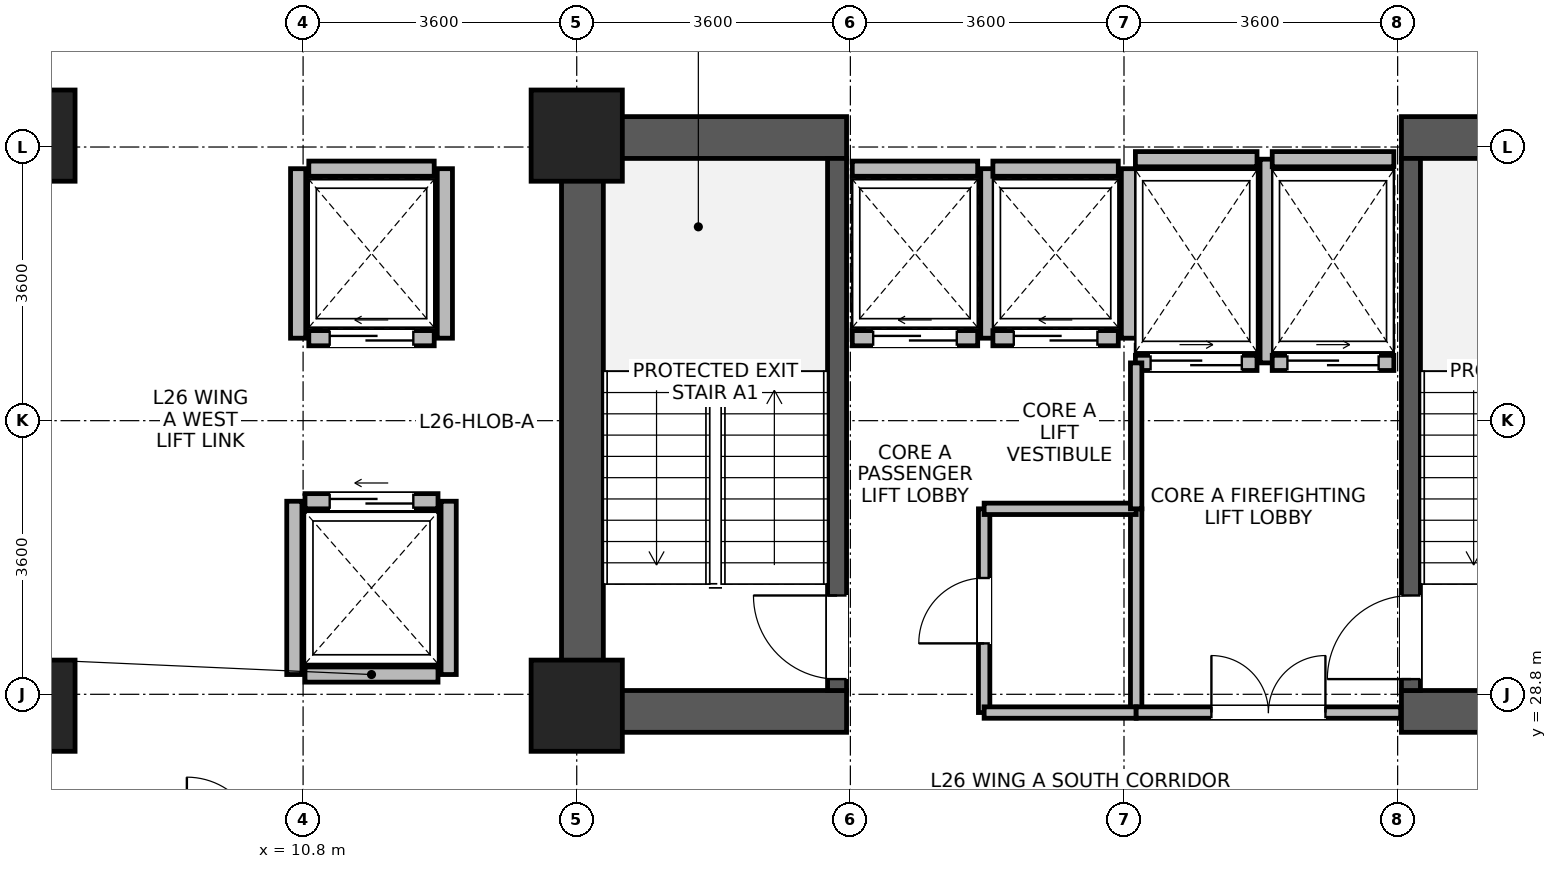
"""IFC4 building model, lengths in metres.
Left out: names, types, materials, properties, quantities, classifications, styles, units other than length and angle.
Written with IfcOpenShell. Run it as: python <this file> out.ifc"""

import sys

from ifc_helpers import new_model, si_unit, direction, frame, frame_2d, origin, origin_2d, place, context, subcontext, project, spatial, rectangle, extrude, source, transform, mapped, element, fill, save


model = new_model("IFC4")
c1 = context("Model", 3, precision=1e-05, world=origin(), true_north=direction((0.0, 1.0)))
c2 = subcontext(c1, "Body", "Model", "MODEL_VIEW")
j1 = project(units=[si_unit("LENGTHUNIT", "METRE"), si_unit("PLANEANGLEUNIT", "RADIAN")], contexts=[c1])
p1 = place(None, origin())
s1 = spatial("IfcSite", under=j1, at=p1, CompositionType="ELEMENT")
p2 = place(p1, origin())
s2 = spatial("IfcBuilding", under=s1, at=p2, CompositionType="ELEMENT")
p3 = place(p2, frame((0.0, 0.0, 104.5)))
s3 = spatial("IfcBuildingStorey", under=s2, at=p3, CompositionType="ELEMENT", Elevation=104.5)
p4 = place(p3, frame((14.475, 28.3, 0.0), z_axis=(0.0, 0.0, 1.0), x_axis=(0.0, 1.0, 0.0)))
e1 = element("IfcWall", 1, at=p4, inside=s3, PredefinedType="SHEAR", context=c2, shape_type="SweptSolid", body=[
    extrude(rectangle(XDim=8.1, YDim=0.55, at=frame_2d((4.05, 0.0))), origin(), (0.0, 0.0, 1.0), 3.45),
])
for number, where, z_axis, x_axis in (
    (2, (14.75, 28.575, 0.0), (0.0, 0.0, 1.0), (1.0, 0.0, 0.0)),
    (3, (25.25, 28.575, 0.0), (0.0, 0.0, 1.0), (1.0, 0.0, 0.0)),
    (4, (14.75, 36.125, 0.0), (0.0, 0.0, 1.0), (1.0, 0.0, 0.0)),
    (5, (25.25, 36.125, 0.0), (0.0, 0.0, 1.0), (1.0, 0.0, 0.0)),
):
    element("IfcWall", number, at=place(p3, frame(where, z_axis=z_axis, x_axis=x_axis)), inside=s3, PredefinedType="SHEAR", context=c2, shape_type="SweptSolid", body=[
        extrude(rectangle(XDim=3.2, YDim=0.55, at=frame_2d((1.6, 0.0))), origin(), (0.0, 0.0, 1.0), 3.45),
    ])
p5 = place(p3, frame((17.825, 28.85, 0.0), z_axis=(0.0, 0.0, 1.0), x_axis=(0.0, 1.0, 0.0)))
e6 = element("IfcWall", 6, at=p5, inside=s3, PredefinedType="SHEAR", context=c2, shape_type="SweptSolid", body=[
    extrude(rectangle(XDim=7.0, YDim=0.25, at=frame_2d((3.5, 0.0))), origin(), (0.0, 0.0, 1.0), 3.45),
])
p6 = place(p5, frame((0.15, 0.0, 0.0)))
e7 = element("IfcOpeningElement", 7, at=p6, cuts=e6, PredefinedType="OPENING", context=c2, shape_type="SweptSolid", body=[
    extrude(rectangle(XDim=1.1, YDim=2.08, at=frame_2d((0.55, 1.04))), frame((0.0, 0.135, 0.0), z_axis=(0.0, -1.0, 0.0), x_axis=(1.0, 0.0, 0.0)), (0.0, 0.0, 1.0), 0.27),
])
p7 = place(p3, frame((25.375, 28.85, 0.0), z_axis=(0.0, 0.0, 1.0), x_axis=(0.0, 1.0, 0.0)))
e8 = element("IfcWall", 8, at=p7, inside=s3, PredefinedType="SHEAR", context=c2, shape_type="SweptSolid", body=[
    extrude(rectangle(XDim=7.0, YDim=0.25, at=frame_2d((3.5, 0.0))), origin(), (0.0, 0.0, 1.0), 3.45),
])
p8 = place(p7, frame((0.15, 0.0, 0.0)))
e9 = element("IfcOpeningElement", 9, at=p8, cuts=e8, PredefinedType="OPENING", context=c2, shape_type="SweptSolid", body=[
    extrude(rectangle(XDim=1.1, YDim=2.08, at=frame_2d((0.55, 1.04))), frame((0.0, 0.135, 0.0), z_axis=(0.0, -1.0, 0.0), x_axis=(1.0, 0.0, 0.0)), (0.0, 0.0, 1.0), 0.27),
])
m1 = source(origin(), c2, "Body", "SweptSolid", [
    extrude(rectangle(XDim=1.2, YDim=1.2, at=origin_2d()), origin(), (0.0, 0.0, 1.0), 3.7),
])
for number, where, z_axis, x_axis in (
    (10, (7.2, 28.65, 0.0), (0.0, 0.0, 1.0), (1.0, 0.0, 0.0)),
    (11, (7.2, 36.15, 0.0), (0.0, 0.0, 1.0), (1.0, 0.0, 0.0)),
    (12, (14.4, 28.65, 0.0), (0.0, 0.0, 1.0), (1.0, 0.0, 0.0)),
    (13, (14.4, 36.15, 0.0), (0.0, 0.0, 1.0), (1.0, 0.0, 0.0)),
):
    element("IfcColumn", number, at=place(p3, frame(where, z_axis=z_axis, x_axis=x_axis)), inside=s3, PredefinedType="COLUMN", context=c2, shape_type="MappedRepresentation", body=[
        mapped(m1, transform((0.0, 0.0, 0.0), x_axis=(1.0, 0.0, 0.0), y_axis=(0.0, 1.0, 0.0), z_axis=(0.0, 0.0, 1.0), scale=1.0)),
    ])
p9 = place(p3, frame((18.025, 33.485, 0.0), z_axis=(0.0, 0.0, 1.0), x_axis=(1.0, 0.0, 0.0)))
e14 = element("IfcWall", 14, at=p9, inside=s3, PredefinedType="PARTITIONING", context=c2, shape_type="SweptSolid", body=[
    extrude(rectangle(XDim=1.65, YDim=0.2, at=frame_2d((0.825, 0.0))), origin(), (0.0, 0.0, 1.0), 3.43),
])
p10 = place(p9, frame((0.275, 0.0, 0.0)))
e15 = element("IfcOpeningElement", 15, at=p10, cuts=e14, PredefinedType="OPENING", context=c2, shape_type="SweptSolid", body=[
    extrude(rectangle(XDim=1.1, YDim=2.12, at=frame_2d((0.55, 1.06))), frame((0.0, 0.11, 0.0), z_axis=(0.0, -1.0, 0.0), x_axis=(1.0, 0.0, 0.0)), (0.0, 0.0, 1.0), 0.22),
])
p11 = place(p3, frame((18.025, 35.715, 0.0), z_axis=(0.0, 0.0, 1.0), x_axis=(1.0, 0.0, 0.0)))
e16 = element("IfcWall", 16, at=p11, inside=s3, PredefinedType="PARTITIONING", context=c2, shape_type="SweptSolid", body=[
    extrude(rectangle(XDim=1.65, YDim=0.2, at=frame_2d((0.825, 0.0))), origin(), (0.0, 0.0, 1.0), 3.43),
])
p12 = place(p3, frame((19.815, 33.485, 0.0), z_axis=(0.0, 0.0, 1.0), x_axis=(0.0, 1.0, 0.0)))
e17 = element("IfcWall", 17, at=p12, inside=s3, PredefinedType="PARTITIONING", context=c2, shape_type="SweptSolid", body=[
    extrude(rectangle(XDim=2.23, YDim=0.2, at=frame_2d((1.115, 0.0))), origin(), (0.0, 0.0, 1.0), 3.43),
])
p13 = place(p3, frame((19.875, 33.485, 0.0), z_axis=(0.0, 0.0, 1.0), x_axis=(1.0, 0.0, 0.0)))
e18 = element("IfcWall", 18, at=p13, inside=s3, PredefinedType="PARTITIONING", context=c2, shape_type="SweptSolid", body=[
    extrude(rectangle(XDim=1.65, YDim=0.2, at=frame_2d((0.825, 0.0))), origin(), (0.0, 0.0, 1.0), 3.43),
])
p14 = place(p13, frame((0.275, 0.0, 0.0)))
e19 = element("IfcOpeningElement", 19, at=p14, cuts=e18, PredefinedType="OPENING", context=c2, shape_type="SweptSolid", body=[
    extrude(rectangle(XDim=1.1, YDim=2.12, at=frame_2d((0.55, 1.06))), frame((0.0, 0.11, 0.0), z_axis=(0.0, -1.0, 0.0), x_axis=(1.0, 0.0, 0.0)), (0.0, 0.0, 1.0), 0.22),
])
p15 = place(p3, frame((19.875, 35.715, 0.0), z_axis=(0.0, 0.0, 1.0), x_axis=(1.0, 0.0, 0.0)))
e20 = element("IfcWall", 20, at=p15, inside=s3, PredefinedType="PARTITIONING", context=c2, shape_type="SweptSolid", body=[
    extrude(rectangle(XDim=1.65, YDim=0.2, at=frame_2d((0.825, 0.0))), origin(), (0.0, 0.0, 1.0), 3.43),
])
p16 = place(p3, frame((21.665, 33.485, 0.0), z_axis=(0.0, 0.0, 1.0), x_axis=(0.0, 1.0, 0.0)))
e21 = element("IfcWall", 21, at=p16, inside=s3, PredefinedType="PARTITIONING", context=c2, shape_type="SweptSolid", body=[
    extrude(rectangle(XDim=2.23, YDim=0.2, at=frame_2d((1.115, 0.0))), origin(), (0.0, 0.0, 1.0), 3.43),
])
p17 = place(p3, frame((10.825, 29.06, 0.0), z_axis=(0.0, 0.0, 1.0), x_axis=(1.0, 0.0, 0.0)))
e22 = element("IfcWall", 22, at=p17, inside=s3, PredefinedType="PARTITIONING", context=c2, shape_type="SweptSolid", body=[
    extrude(rectangle(XDim=1.75, YDim=0.2, at=frame_2d((0.875, 0.0))), origin(), (0.0, 0.0, 1.0), 3.43),
])
p18 = place(p3, frame((10.825, 31.34, 0.0), z_axis=(0.0, 0.0, 1.0), x_axis=(1.0, 0.0, 0.0)))
e23 = element("IfcWall", 23, at=p18, inside=s3, PredefinedType="PARTITIONING", context=c2, shape_type="SweptSolid", body=[
    extrude(rectangle(XDim=1.75, YDim=0.2, at=frame_2d((0.875, 0.0))), origin(), (0.0, 0.0, 1.0), 3.43),
])
p19 = place(p18, frame((0.325, 0.0, 0.0)))
e24 = element("IfcOpeningElement", 24, at=p19, cuts=e23, PredefinedType="OPENING", context=c2, shape_type="SweptSolid", body=[
    extrude(rectangle(XDim=1.1, YDim=2.12, at=frame_2d((0.55, 1.06))), frame((0.0, 0.11, 0.0), z_axis=(0.0, -1.0, 0.0), x_axis=(1.0, 0.0, 0.0)), (0.0, 0.0, 1.0), 0.22),
])
for number, where, z_axis, x_axis in (
    (25, (10.685, 29.06, 0.0), (0.0, 0.0, 1.0), (0.0, 1.0, 0.0)),
    (26, (12.715, 29.06, 0.0), (0.0, 0.0, 1.0), (0.0, 1.0, 0.0)),
):
    element("IfcWall", number, at=place(p3, frame(where, z_axis=z_axis, x_axis=x_axis)), inside=s3, PredefinedType="PARTITIONING", context=c2, shape_type="SweptSolid", body=[
        extrude(rectangle(XDim=2.28, YDim=0.2, at=frame_2d((1.14, 0.0))), origin(), (0.0, 0.0, 1.0), 3.43),
    ])
p20 = place(p3, frame((10.875, 33.485, 0.0), z_axis=(0.0, 0.0, 1.0), x_axis=(1.0, 0.0, 0.0)))
e27 = element("IfcWall", 27, at=p20, inside=s3, PredefinedType="PARTITIONING", context=c2, shape_type="SweptSolid", body=[
    extrude(rectangle(XDim=1.65, YDim=0.2, at=frame_2d((0.825, 0.0))), origin(), (0.0, 0.0, 1.0), 3.43),
])
p21 = place(p20, frame((0.275, 0.0, 0.0)))
e28 = element("IfcOpeningElement", 28, at=p21, cuts=e27, PredefinedType="OPENING", context=c2, shape_type="SweptSolid", body=[
    extrude(rectangle(XDim=1.1, YDim=2.12, at=frame_2d((0.55, 1.06))), frame((0.0, 0.11, 0.0), z_axis=(0.0, -1.0, 0.0), x_axis=(1.0, 0.0, 0.0)), (0.0, 0.0, 1.0), 0.22),
])
p22 = place(p3, frame((10.875, 35.715, 0.0), z_axis=(0.0, 0.0, 1.0), x_axis=(1.0, 0.0, 0.0)))
e29 = element("IfcWall", 29, at=p22, inside=s3, PredefinedType="PARTITIONING", context=c2, shape_type="SweptSolid", body=[
    extrude(rectangle(XDim=1.65, YDim=0.2, at=frame_2d((0.825, 0.0))), origin(), (0.0, 0.0, 1.0), 3.43),
])
for number, where, z_axis, x_axis in (
    (30, (10.735, 33.485, 0.0), (0.0, 0.0, 1.0), (0.0, 1.0, 0.0)),
    (31, (12.665, 33.485, 0.0), (0.0, 0.0, 1.0), (0.0, 1.0, 0.0)),
):
    element("IfcWall", number, at=place(p3, frame(where, z_axis=z_axis, x_axis=x_axis)), inside=s3, PredefinedType="PARTITIONING", context=c2, shape_type="SweptSolid", body=[
        extrude(rectangle(XDim=2.23, YDim=0.2, at=frame_2d((1.115, 0.0))), origin(), (0.0, 0.0, 1.0), 3.43),
    ])
p23 = place(p3, frame((21.75, 33.16, 0.0), z_axis=(0.0, 0.0, 1.0), x_axis=(1.0, 0.0, 0.0)))
e32 = element("IfcWall", 32, at=p23, inside=s3, PredefinedType="PARTITIONING", context=c2, shape_type="SweptSolid", body=[
    extrude(rectangle(XDim=1.6, YDim=0.2, at=frame_2d((0.8, 0.0))), origin(), (0.0, 0.0, 1.0), 3.43),
])
p24 = place(p23, frame((0.2, 0.0, 0.0)))
e33 = element("IfcOpeningElement", 33, at=p24, cuts=e32, PredefinedType="OPENING", context=c2, shape_type="SweptSolid", body=[
    extrude(rectangle(XDim=1.2, YDim=2.12, at=frame_2d((0.6, 1.06))), frame((0.0, 0.11, 0.0), z_axis=(0.0, -1.0, 0.0), x_axis=(1.0, 0.0, 0.0)), (0.0, 0.0, 1.0), 0.22),
])
p25 = place(p3, frame((21.75, 35.84, 0.0), z_axis=(0.0, 0.0, 1.0), x_axis=(1.0, 0.0, 0.0)))
e34 = element("IfcWall", 34, at=p25, inside=s3, PredefinedType="PARTITIONING", context=c2, shape_type="SweptSolid", body=[
    extrude(rectangle(XDim=1.6, YDim=0.2, at=frame_2d((0.8, 0.0))), origin(), (0.0, 0.0, 1.0), 2.43),
])
p26 = place(p3, frame((23.49, 33.16, 0.0), z_axis=(0.0, 0.0, 1.0), x_axis=(0.0, 1.0, 0.0)))
e35 = element("IfcWall", 35, at=p26, inside=s3, PredefinedType="PARTITIONING", context=c2, shape_type="SweptSolid", body=[
    extrude(rectangle(XDim=2.68, YDim=0.2, at=frame_2d((1.34, 0.0))), origin(), (0.0, 0.0, 1.0), 3.43),
])
p27 = place(p3, frame((23.55, 33.16, 0.0), z_axis=(0.0, 0.0, 1.0), x_axis=(1.0, 0.0, 0.0)))
e36 = element("IfcWall", 36, at=p27, inside=s3, PredefinedType="PARTITIONING", context=c2, shape_type="SweptSolid", body=[
    extrude(rectangle(XDim=1.6, YDim=0.2, at=frame_2d((0.8, 0.0))), origin(), (0.0, 0.0, 1.0), 3.43),
])
p28 = place(p27, frame((0.2, 0.0, 0.0)))
e37 = element("IfcOpeningElement", 37, at=p28, cuts=e36, PredefinedType="OPENING", context=c2, shape_type="SweptSolid", body=[
    extrude(rectangle(XDim=1.2, YDim=2.12, at=frame_2d((0.6, 1.06))), frame((0.0, 0.11, 0.0), z_axis=(0.0, -1.0, 0.0), x_axis=(1.0, 0.0, 0.0)), (0.0, 0.0, 1.0), 0.22),
])
p29 = place(p3, frame((23.55, 35.84, 0.0), z_axis=(0.0, 0.0, 1.0), x_axis=(1.0, 0.0, 0.0)))
e38 = element("IfcWall", 38, at=p29, inside=s3, PredefinedType="PARTITIONING", context=c2, shape_type="SweptSolid", body=[
    extrude(rectangle(XDim=1.6, YDim=0.2, at=frame_2d((0.8, 0.0))), origin(), (0.0, 0.0, 1.0), 2.43),
])
p30 = place(p3, frame((19.76, 28.56, 0.0), z_axis=(0.0, 0.0, 1.0), x_axis=(0.0, 1.0, 0.0)))
e39 = element("IfcWall", 39, at=p30, inside=s3, PredefinedType="PARTITIONING", context=c2, shape_type="SweptSolid", body=[
    extrude(rectangle(XDim=2.68, YDim=0.15, at=frame_2d((1.34, 0.0))), origin(), (0.0, 0.0, 1.0), 3.43),
])
p31 = place(p30, frame((0.91, 0.0, 0.0)))
e40 = element("IfcOpeningElement", 40, at=p31, cuts=e39, PredefinedType="OPENING", context=c2, shape_type="SweptSolid", body=[
    extrude(rectangle(XDim=0.86, YDim=2.02, at=frame_2d((0.43, 1.01))), frame((0.0, 0.085, 0.0), z_axis=(0.0, -1.0, 0.0), x_axis=(1.0, 0.0, 0.0)), (0.0, 0.0, 1.0), 0.17),
])
p32 = place(p3, frame((21.76, 28.56, 0.0), z_axis=(0.0, 0.0, 1.0), x_axis=(0.0, 1.0, 0.0)))
e41 = element("IfcWall", 41, at=p32, inside=s3, PredefinedType="PARTITIONING", context=c2, shape_type="SweptSolid", body=[
    extrude(rectangle(XDim=2.68, YDim=0.15, at=frame_2d((1.34, 0.0))), origin(), (0.0, 0.0, 1.0), 3.43),
])
p33 = place(p3, frame((19.76, 28.56, 0.0), z_axis=(0.0, 0.0, 1.0), x_axis=(1.0, 0.0, 0.0)))
e42 = element("IfcWall", 42, at=p33, inside=s3, PredefinedType="PARTITIONING", context=c2, shape_type="SweptSolid", body=[
    extrude(rectangle(XDim=2.0, YDim=0.15, at=frame_2d((1.0, 0.0))), origin(), (0.0, 0.0, 1.0), 2.43),
])
p34 = place(p3, frame((19.76, 31.24, 0.0), z_axis=(0.0, 0.0, 1.0), x_axis=(1.0, 0.0, 0.0)))
e43 = element("IfcWall", 43, at=p34, inside=s3, PredefinedType="PARTITIONING", context=c2, shape_type="SweptSolid", body=[
    extrude(rectangle(XDim=2.0, YDim=0.15, at=frame_2d((1.0, 0.0))), origin(), (0.0, 0.0, 1.0), 3.43),
])
p35 = place(p3, frame((21.76, 28.56, 0.0), z_axis=(0.0, 0.0, 1.0), x_axis=(1.0, 0.0, 0.0)))
e44 = element("IfcWall", 44, at=p35, inside=s3, PredefinedType="PARTITIONING", context=c2, shape_type="SweptSolid", body=[
    extrude(rectangle(XDim=3.48, YDim=0.15, at=frame_2d((1.74, 0.0))), origin(), (0.0, 0.0, 1.0), 2.43),
])
p36 = place(p35, frame((0.99, 0.0, 0.0)))
e45 = element("IfcOpeningElement", 45, at=p36, cuts=e44, PredefinedType="OPENING", context=c2, shape_type="SweptSolid", body=[
    extrude(rectangle(XDim=1.5, YDim=2.1, at=frame_2d((0.75, 1.05))), frame((0.0, 0.085, 0.0), z_axis=(0.0, -1.0, 0.0), x_axis=(1.0, 0.0, 0.0)), (0.0, 0.0, 1.0), 0.17),
])
p37 = place(p3, frame((21.76, 31.24, 0.0), z_axis=(0.0, 0.0, 1.0), x_axis=(0.0, 1.0, 0.0)))
e46 = element("IfcWall", 46, at=p37, inside=s3, PredefinedType="PARTITIONING", context=c2, shape_type="SweptSolid", body=[
    extrude(rectangle(XDim=1.92, YDim=0.15, at=frame_2d((0.96, 0.0))), origin(), (0.0, 0.0, 1.0), 3.43),
])
p38 = place(p6, origin())
e47 = element("IfcDoor", 47, at=p38, inside=s3, OperationType="SINGLE_SWING_RIGHT", PredefinedType="DOOR", context=c2, shape_type="SweptSolid", body=[
    extrude(rectangle(XDim=1.1, YDim=2.08, at=frame_2d((0.55, 1.04))), frame((0.0, 0.025, 0.0), z_axis=(0.0, -1.0, 0.0), x_axis=(1.0, 0.0, 0.0)), (0.0, 0.0, 1.0), 0.05),
])
fill(e7, e47)
p39 = place(p8, origin())
e48 = element("IfcDoor", 48, at=p39, inside=s3, OperationType="SINGLE_SWING_LEFT", PredefinedType="DOOR", context=c2, shape_type="SweptSolid", body=[
    extrude(rectangle(XDim=1.1, YDim=2.08, at=frame_2d((0.55, 1.04))), frame((0.0, 0.025, 0.0), z_axis=(0.0, -1.0, 0.0), x_axis=(1.0, 0.0, 0.0)), (0.0, 0.0, 1.0), 0.05),
])
fill(e9, e48)
p40 = place(p10, origin())
e49 = element("IfcDoor", 49, at=p40, inside=s3, OperationType="SLIDING_TO_LEFT", PredefinedType="DOOR", context=c2, shape_type="SweptSolid", body=[
    extrude(rectangle(XDim=1.1, YDim=2.12, at=frame_2d((0.55, 1.06))), frame((0.0, 0.025, 0.0), z_axis=(0.0, -1.0, 0.0), x_axis=(1.0, 0.0, 0.0)), (0.0, 0.0, 1.0), 0.05),
])
fill(e15, e49)
p41 = place(p14, origin())
e50 = element("IfcDoor", 50, at=p41, inside=s3, OperationType="SLIDING_TO_LEFT", PredefinedType="DOOR", context=c2, shape_type="SweptSolid", body=[
    extrude(rectangle(XDim=1.1, YDim=2.12, at=frame_2d((0.55, 1.06))), frame((0.0, 0.025, 0.0), z_axis=(0.0, -1.0, 0.0), x_axis=(1.0, 0.0, 0.0)), (0.0, 0.0, 1.0), 0.05),
])
fill(e19, e50)
p42 = place(p19, origin())
e51 = element("IfcDoor", 51, at=p42, inside=s3, OperationType="SLIDING_TO_LEFT", PredefinedType="DOOR", context=c2, shape_type="SweptSolid", body=[
    extrude(rectangle(XDim=1.1, YDim=2.12, at=frame_2d((0.55, 1.06))), frame((0.0, 0.025, 0.0), z_axis=(0.0, -1.0, 0.0), x_axis=(1.0, 0.0, 0.0)), (0.0, 0.0, 1.0), 0.05),
])
fill(e24, e51)
p43 = place(p21, origin())
e52 = element("IfcDoor", 52, at=p43, inside=s3, OperationType="SLIDING_TO_LEFT", PredefinedType="DOOR", context=c2, shape_type="SweptSolid", body=[
    extrude(rectangle(XDim=1.1, YDim=2.12, at=frame_2d((0.55, 1.06))), frame((0.0, 0.025, 0.0), z_axis=(0.0, -1.0, 0.0), x_axis=(1.0, 0.0, 0.0)), (0.0, 0.0, 1.0), 0.05),
])
fill(e28, e52)
p44 = place(p24, origin())
e53 = element("IfcDoor", 53, at=p44, inside=s3, OperationType="SLIDING_TO_RIGHT", PredefinedType="DOOR", context=c2, shape_type="SweptSolid", body=[
    extrude(rectangle(XDim=1.2, YDim=2.12, at=frame_2d((0.6, 1.06))), frame((0.0, 0.025, 0.0), z_axis=(0.0, -1.0, 0.0), x_axis=(1.0, 0.0, 0.0)), (0.0, 0.0, 1.0), 0.05),
])
fill(e33, e53)
p45 = place(p28, origin())
e54 = element("IfcDoor", 54, at=p45, inside=s3, OperationType="SLIDING_TO_RIGHT", PredefinedType="DOOR", context=c2, shape_type="SweptSolid", body=[
    extrude(rectangle(XDim=1.2, YDim=2.12, at=frame_2d((0.6, 1.06))), frame((0.0, 0.025, 0.0), z_axis=(0.0, -1.0, 0.0), x_axis=(1.0, 0.0, 0.0)), (0.0, 0.0, 1.0), 0.05),
])
fill(e37, e54)
p46 = place(p31, origin())
e55 = element("IfcDoor", 55, at=p46, inside=s3, OperationType="SINGLE_SWING_LEFT", PredefinedType="DOOR", context=c2, shape_type="SweptSolid", body=[
    extrude(rectangle(XDim=0.86, YDim=2.02, at=frame_2d((0.43, 1.01))), frame((0.0, 0.025, 0.0), z_axis=(0.0, -1.0, 0.0), x_axis=(1.0, 0.0, 0.0)), (0.0, 0.0, 1.0), 0.05),
])
fill(e40, e55)
p47 = place(p36, origin())
e56 = element("IfcDoor", 56, at=p47, inside=s3, OperationType="DOUBLE_DOOR_SINGLE_SWING", PredefinedType="DOOR", context=c2, shape_type="SweptSolid", body=[
    extrude(rectangle(XDim=1.5, YDim=2.1, at=frame_2d((0.75, 1.05))), frame((0.0, 0.025, 0.0), z_axis=(0.0, -1.0, 0.0), x_axis=(1.0, 0.0, 0.0)), (0.0, 0.0, 1.0), 0.05),
])
fill(e45, e56)
save(model, sys.argv[1])
